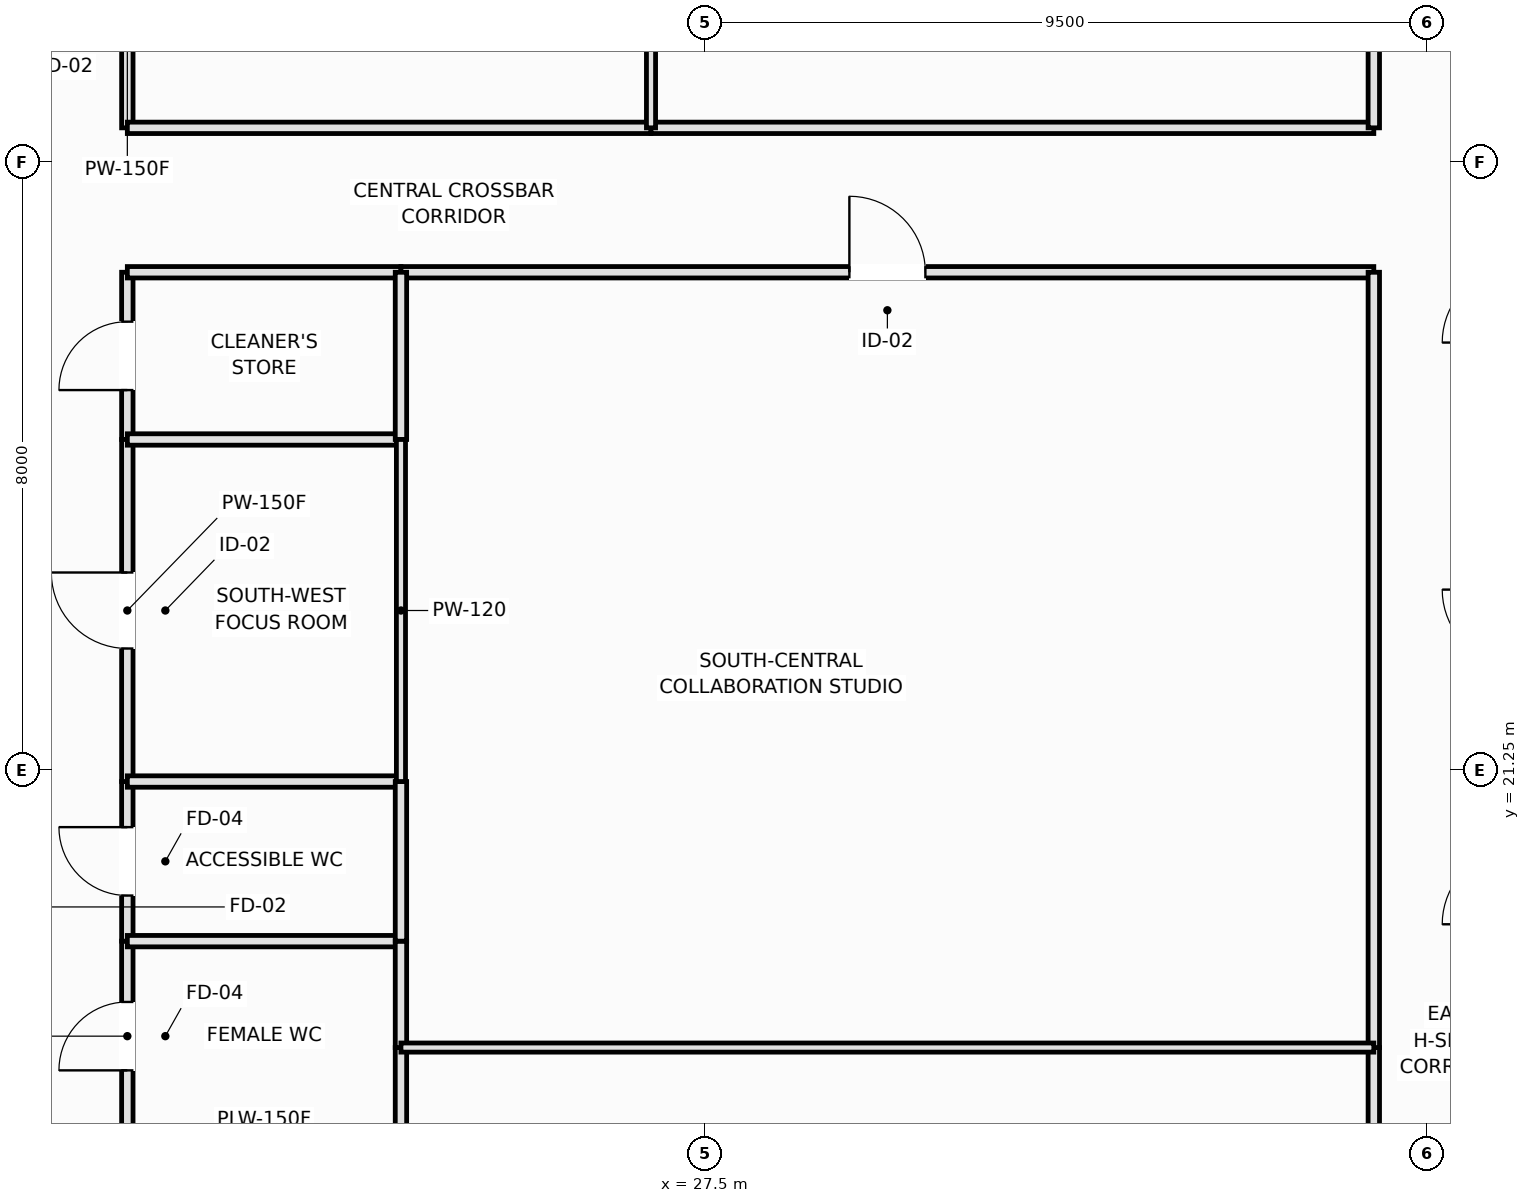
"""IFC4 building model, lengths in metres.
Left out: names, types, materials, properties, quantities, classifications, styles, units other than length and angle.
Written with IfcOpenShell. Run it as: python <this file> out.ifc"""

import sys

from ifc_helpers import new_model, si_unit, direction, frame, frame_2d, origin, place, context, subcontext, project, spatial, rectangle, extrude, element, fill, save


model = new_model("IFC4")
c1 = context("Model", 3, precision=1e-05, world=origin(), true_north=direction((0.0, 1.0)))
c2 = subcontext(c1, "Body", "Model", "MODEL_VIEW")
j1 = project(units=[si_unit("LENGTHUNIT", "METRE"), si_unit("PLANEANGLEUNIT", "RADIAN")], contexts=[c1])
p1 = place(None, origin())
s1 = spatial("IfcSite", under=j1, at=p1, CompositionType="ELEMENT")
p2 = place(p1, origin())
s2 = spatial("IfcBuilding", under=s1, at=p2, CompositionType="ELEMENT")
p3 = place(p2, frame((0.0, 0.0, 281.2)))
s3 = spatial("IfcBuildingStorey", under=s2, at=p3, CompositionType="ELEMENT", Elevation=281.2)
p4 = place(p3, frame((19.9, 29.7, 0.0), z_axis=(0.0, 0.0, 1.0), x_axis=(0.0, 1.0, 0.0)))
e1 = element("IfcWall", 1, at=p4, inside=s3, PredefinedType="PARTITIONING", context=c2, shape_type="SweptSolid", body=[
    extrude(rectangle(XDim=4.9, YDim=0.15, at=frame_2d((2.45, 0.0))), origin(), (0.0, 0.0, 1.0), 3.39),
])
p5 = place(p4, frame((1.95, 0.0, 0.0)))
e2 = element("IfcOpeningElement", 2, at=p5, cuts=e1, PredefinedType="OPENING", context=c2, shape_type="SweptSolid", body=[
    extrude(rectangle(XDim=1.0, YDim=2.15, at=frame_2d((0.5, 1.075))), frame((0.0, 0.085, 0.0), z_axis=(0.0, -1.0, 0.0), x_axis=(1.0, 0.0, 0.0)), (0.0, 0.0, 1.0), 0.17),
])
p6 = place(p3, frame((19.9, 16.5, 0.0), z_axis=(0.0, 0.0, 1.0), x_axis=(0.0, 1.0, 0.0)))
e3 = element("IfcWall", 3, at=p6, inside=s3, PredefinedType="PLUMBINGWALL", context=c2, shape_type="SweptSolid", body=[
    extrude(rectangle(XDim=2.5, YDim=0.15, at=frame_2d((1.25, 0.0))), origin(), (0.0, 0.0, 1.0), 3.39),
])
p7 = place(p6, frame((0.8, 0.0, 0.0)))
e4 = element("IfcOpeningElement", 4, at=p7, cuts=e3, PredefinedType="OPENING", context=c2, shape_type="SweptSolid", body=[
    extrude(rectangle(XDim=0.9, YDim=2.1, at=frame_2d((0.45, 1.05))), frame((0.0, 0.085, 0.0), z_axis=(0.0, -1.0, 0.0), x_axis=(1.0, 0.0, 0.0)), (0.0, 0.0, 1.0), 0.17),
])
p8 = place(p3, frame((19.9, 19.0, 0.0), z_axis=(0.0, 0.0, 1.0), x_axis=(0.0, 1.0, 0.0)))
e5 = element("IfcWall", 5, at=p8, inside=s3, PredefinedType="PLUMBINGWALL", context=c2, shape_type="SweptSolid", body=[
    extrude(rectangle(XDim=2.1, YDim=0.15, at=frame_2d((1.05, 0.0))), origin(), (0.0, 0.0, 1.0), 3.39),
])
p9 = place(p8, frame((0.6, 0.0, 0.0)))
e6 = element("IfcOpeningElement", 6, at=p9, cuts=e5, PredefinedType="OPENING", context=c2, shape_type="SweptSolid", body=[
    extrude(rectangle(XDim=0.9, YDim=2.1, at=frame_2d((0.45, 1.05))), frame((0.0, 0.085, 0.0), z_axis=(0.0, -1.0, 0.0), x_axis=(1.0, 0.0, 0.0)), (0.0, 0.0, 1.0), 0.17),
])
p10 = place(p3, frame((19.9, 25.6, 0.0), z_axis=(0.0, 0.0, 1.0), x_axis=(0.0, 1.0, 0.0)))
e7 = element("IfcWall", 7, at=p10, inside=s3, PredefinedType="PLUMBINGWALL", context=c2, shape_type="SweptSolid", body=[
    extrude(rectangle(XDim=2.2, YDim=0.15, at=frame_2d((1.1, 0.0))), origin(), (0.0, 0.0, 1.0), 3.39),
])
p11 = place(p10, frame((0.65, 0.0, 0.0)))
e8 = element("IfcOpeningElement", 8, at=p11, cuts=e7, PredefinedType="OPENING", context=c2, shape_type="SweptSolid", body=[
    extrude(rectangle(XDim=0.9, YDim=2.1, at=frame_2d((0.45, 1.05))), frame((0.0, 0.085, 0.0), z_axis=(0.0, -1.0, 0.0), x_axis=(1.0, 0.0, 0.0)), (0.0, 0.0, 1.0), 0.17),
])
p12 = place(p3, frame((19.9, 21.1, 0.0), z_axis=(0.0, 0.0, 1.0), x_axis=(0.0, 1.0, 0.0)))
e9 = element("IfcWall", 9, at=p12, inside=s3, PredefinedType="PARTITIONING", context=c2, shape_type="SweptSolid", body=[
    extrude(rectangle(XDim=4.5, YDim=0.15, at=frame_2d((2.25, 0.0))), origin(), (0.0, 0.0, 1.0), 3.39),
])
p13 = place(p12, frame((1.75, 0.0, 0.0)))
e10 = element("IfcOpeningElement", 10, at=p13, cuts=e9, PredefinedType="OPENING", context=c2, shape_type="SweptSolid", body=[
    extrude(rectangle(XDim=1.0, YDim=2.15, at=frame_2d((0.5, 1.075))), frame((0.0, 0.085, 0.0), z_axis=(0.0, -1.0, 0.0), x_axis=(1.0, 0.0, 0.0)), (0.0, 0.0, 1.0), 0.17),
])
p14 = place(p3, frame((19.9, 29.7, 0.0), z_axis=(0.0, 0.0, 1.0), x_axis=(1.0, 0.0, 0.0)))
e11 = element("IfcWall", 11, at=p14, inside=s3, PredefinedType="PARTITIONING", context=c2, shape_type="SweptSolid", body=[
    extrude(rectangle(XDim=6.89, YDim=0.15, at=frame_2d((3.445, 0.0))), origin(), (0.0, 0.0, 1.0), 3.39),
])
p15 = place(p3, frame((26.79, 29.7, 0.0), z_axis=(0.0, 0.0, 1.0), x_axis=(1.0, 0.0, 0.0)))
e12 = element("IfcWall", 12, at=p15, inside=s3, PredefinedType="PARTITIONING", context=c2, shape_type="SweptSolid", body=[
    extrude(rectangle(XDim=9.51, YDim=0.15, at=frame_2d((4.755, 0.0))), origin(), (0.0, 0.0, 1.0), 3.39),
])
p16 = place(p3, frame((19.9, 27.8, 0.0), z_axis=(0.0, 0.0, 1.0), x_axis=(1.0, 0.0, 0.0)))
e13 = element("IfcWall", 13, at=p16, inside=s3, PredefinedType="PLUMBINGWALL", context=c2, shape_type="SweptSolid", body=[
    extrude(rectangle(XDim=3.6, YDim=0.15, at=frame_2d((1.8, 0.0))), origin(), (0.0, 0.0, 1.0), 3.39),
])
p17 = place(p3, frame((23.5, 27.8, 0.0), z_axis=(0.0, 0.0, 1.0), x_axis=(1.0, 0.0, 0.0)))
e14 = element("IfcWall", 14, at=p17, inside=s3, PredefinedType="PARTITIONING", context=c2, shape_type="SweptSolid", body=[
    extrude(rectangle(XDim=12.8, YDim=0.15, at=frame_2d((6.4, 0.0))), origin(), (0.0, 0.0, 1.0), 3.39),
])
p18 = place(p17, frame((5.9, 0.0, 0.0)))
e15 = element("IfcOpeningElement", 15, at=p18, cuts=e14, PredefinedType="OPENING", context=c2, shape_type="SweptSolid", body=[
    extrude(rectangle(XDim=1.0, YDim=2.15, at=frame_2d((0.5, 1.075))), frame((0.0, 0.085, 0.0), z_axis=(0.0, -1.0, 0.0), x_axis=(1.0, 0.0, 0.0)), (0.0, 0.0, 1.0), 0.17),
])
p19 = place(p3, frame((36.3, 29.7, 0.0), z_axis=(0.0, 0.0, 1.0), x_axis=(0.0, 1.0, 0.0)))
e16 = element("IfcWall", 16, at=p19, inside=s3, PredefinedType="PARTITIONING", context=c2, shape_type="SweptSolid", body=[
    extrude(rectangle(XDim=4.9, YDim=0.15, at=frame_2d((2.45, 0.0))), origin(), (0.0, 0.0, 1.0), 3.39),
])
p20 = place(p19, frame((1.95, 0.0, 0.0)))
e17 = element("IfcOpeningElement", 17, at=p20, cuts=e16, PredefinedType="OPENING", context=c2, shape_type="SweptSolid", body=[
    extrude(rectangle(XDim=1.0, YDim=2.15, at=frame_2d((0.5, 1.075))), frame((0.0, 0.085, 0.0), z_axis=(0.0, -1.0, 0.0), x_axis=(1.0, 0.0, 0.0)), (0.0, 0.0, 1.0), 0.17),
])
p21 = place(p3, frame((36.3, 14.0, 0.0), z_axis=(0.0, 0.0, 1.0), x_axis=(0.0, 1.0, 0.0)))
e18 = element("IfcWall", 18, at=p21, inside=s3, PredefinedType="PARTITIONING", context=c2, shape_type="SweptSolid", body=[
    extrude(rectangle(XDim=3.6, YDim=0.15, at=frame_2d((1.8, 0.0))), origin(), (0.0, 0.0, 1.0), 3.39),
])
p22 = place(p21, frame((1.3, 0.0, 0.0)))
e19 = element("IfcOpeningElement", 19, at=p22, cuts=e18, PredefinedType="OPENING", context=c2, shape_type="SweptSolid", body=[
    extrude(rectangle(XDim=1.0, YDim=2.15, at=frame_2d((0.5, 1.075))), frame((0.0, 0.085, 0.0), z_axis=(0.0, -1.0, 0.0), x_axis=(1.0, 0.0, 0.0)), (0.0, 0.0, 1.0), 0.17),
])
p23 = place(p3, frame((36.3, 17.6, 0.0), z_axis=(0.0, 0.0, 1.0), x_axis=(0.0, 1.0, 0.0)))
e20 = element("IfcWall", 20, at=p23, inside=s3, PredefinedType="PARTITIONING", context=c2, shape_type="SweptSolid", body=[
    extrude(rectangle(XDim=10.2, YDim=0.15, at=frame_2d((5.1, 0.0))), origin(), (0.0, 0.0, 1.0), 3.39),
])
p24 = place(p3, frame((26.79, 29.7, 0.0), z_axis=(0.0, 0.0, 1.0), x_axis=(0.0, 1.0, 0.0)))
e21 = element("IfcWall", 21, at=p24, inside=s3, PredefinedType="PARTITIONING", context=c2, shape_type="SweptSolid", body=[
    extrude(rectangle(XDim=4.9, YDim=0.12, at=frame_2d((2.45, 0.0))), origin(), (0.0, 0.0, 1.0), 3.39),
])
p25 = place(p3, frame((19.9, 19.0, 0.0), z_axis=(0.0, 0.0, 1.0), x_axis=(1.0, 0.0, 0.0)))
e22 = element("IfcWall", 22, at=p25, inside=s3, PredefinedType="PLUMBINGWALL", context=c2, shape_type="SweptSolid", body=[
    extrude(rectangle(XDim=3.6, YDim=0.15, at=frame_2d((1.8, 0.0))), origin(), (0.0, 0.0, 1.0), 3.39),
])
p26 = place(p3, frame((23.5, 16.5, 0.0), z_axis=(0.0, 0.0, 1.0), x_axis=(0.0, 1.0, 0.0)))
e23 = element("IfcWall", 23, at=p26, inside=s3, PredefinedType="PLUMBINGWALL", context=c2, shape_type="SweptSolid", body=[
    extrude(rectangle(XDim=1.1, YDim=0.15, at=frame_2d((0.55, 0.0))), origin(), (0.0, 0.0, 1.0), 3.39),
])
p27 = place(p3, frame((23.5, 17.6, 0.0), z_axis=(0.0, 0.0, 1.0), x_axis=(0.0, 1.0, 0.0)))
e24 = element("IfcWall", 24, at=p27, inside=s3, PredefinedType="PLUMBINGWALL", context=c2, shape_type="SweptSolid", body=[
    extrude(rectangle(XDim=1.4, YDim=0.15, at=frame_2d((0.7, 0.0))), origin(), (0.0, 0.0, 1.0), 3.39),
])
p28 = place(p3, frame((19.9, 21.1, 0.0), z_axis=(0.0, 0.0, 1.0), x_axis=(1.0, 0.0, 0.0)))
e25 = element("IfcWall", 25, at=p28, inside=s3, PredefinedType="PLUMBINGWALL", context=c2, shape_type="SweptSolid", body=[
    extrude(rectangle(XDim=3.6, YDim=0.15, at=frame_2d((1.8, 0.0))), origin(), (0.0, 0.0, 1.0), 3.39),
])
p29 = place(p3, frame((23.5, 19.0, 0.0), z_axis=(0.0, 0.0, 1.0), x_axis=(0.0, 1.0, 0.0)))
e26 = element("IfcWall", 26, at=p29, inside=s3, PredefinedType="PLUMBINGWALL", context=c2, shape_type="SweptSolid", body=[
    extrude(rectangle(XDim=2.1, YDim=0.15, at=frame_2d((1.05, 0.0))), origin(), (0.0, 0.0, 1.0), 3.39),
])
p30 = place(p3, frame((19.9, 25.6, 0.0), z_axis=(0.0, 0.0, 1.0), x_axis=(1.0, 0.0, 0.0)))
e27 = element("IfcWall", 27, at=p30, inside=s3, PredefinedType="PLUMBINGWALL", context=c2, shape_type="SweptSolid", body=[
    extrude(rectangle(XDim=3.6, YDim=0.15, at=frame_2d((1.8, 0.0))), origin(), (0.0, 0.0, 1.0), 3.39),
])
p31 = place(p3, frame((23.5, 25.6, 0.0), z_axis=(0.0, 0.0, 1.0), x_axis=(0.0, 1.0, 0.0)))
e28 = element("IfcWall", 28, at=p31, inside=s3, PredefinedType="PLUMBINGWALL", context=c2, shape_type="SweptSolid", body=[
    extrude(rectangle(XDim=2.2, YDim=0.15, at=frame_2d((1.1, 0.0))), origin(), (0.0, 0.0, 1.0), 3.39),
])
p32 = place(p3, frame((23.5, 21.1, 0.0), z_axis=(0.0, 0.0, 1.0), x_axis=(0.0, 1.0, 0.0)))
e29 = element("IfcWall", 29, at=p32, inside=s3, PredefinedType="PARTITIONING", context=c2, shape_type="SweptSolid", body=[
    extrude(rectangle(XDim=4.5, YDim=0.12, at=frame_2d((2.25, 0.0))), origin(), (0.0, 0.0, 1.0), 3.39),
])
p33 = place(p3, frame((23.5, 17.6, 0.0), z_axis=(0.0, 0.0, 1.0), x_axis=(1.0, 0.0, 0.0)))
e30 = element("IfcWall", 30, at=p33, inside=s3, PredefinedType="PARTITIONING", context=c2, shape_type="SweptSolid", body=[
    extrude(rectangle(XDim=12.8, YDim=0.12, at=frame_2d((6.4, 0.0))), origin(), (0.0, 0.0, 1.0), 3.39),
])
p34 = place(p7, origin())
e31 = element("IfcDoor", 31, at=p34, inside=s3, OperationType="SINGLE_SWING_LEFT", PredefinedType="DOOR", context=c2, shape_type="SweptSolid", body=[
    extrude(rectangle(XDim=0.9, YDim=2.1, at=frame_2d((0.45, 1.05))), frame((0.0, 0.025, 0.0), z_axis=(0.0, -1.0, 0.0), x_axis=(1.0, 0.0, 0.0)), (0.0, 0.0, 1.0), 0.05),
])
fill(e4, e31)
p35 = place(p9, origin())
e32 = element("IfcDoor", 32, at=p35, inside=s3, OperationType="SINGLE_SWING_RIGHT", PredefinedType="DOOR", context=c2, shape_type="SweptSolid", body=[
    extrude(rectangle(XDim=0.9, YDim=2.1, at=frame_2d((0.45, 1.05))), frame((0.0, 0.025, 0.0), z_axis=(0.0, -1.0, 0.0), x_axis=(1.0, 0.0, 0.0)), (0.0, 0.0, 1.0), 0.05),
])
fill(e6, e32)
p36 = place(p11, origin())
e33 = element("IfcDoor", 33, at=p36, inside=s3, OperationType="SINGLE_SWING_LEFT", PredefinedType="DOOR", context=c2, shape_type="SweptSolid", body=[
    extrude(rectangle(XDim=0.9, YDim=2.1, at=frame_2d((0.45, 1.05))), frame((0.0, 0.025, 0.0), z_axis=(0.0, -1.0, 0.0), x_axis=(1.0, 0.0, 0.0)), (0.0, 0.0, 1.0), 0.05),
])
fill(e8, e33)
p37 = place(p13, origin())
e34 = element("IfcDoor", 34, at=p37, inside=s3, OperationType="SINGLE_SWING_RIGHT", PredefinedType="DOOR", context=c2, shape_type="SweptSolid", body=[
    extrude(rectangle(XDim=1.0, YDim=2.15, at=frame_2d((0.5, 1.075))), frame((0.0, 0.025, 0.0), z_axis=(0.0, -1.0, 0.0), x_axis=(1.0, 0.0, 0.0)), (0.0, 0.0, 1.0), 0.05),
])
fill(e10, e34)
p38 = place(p18, origin())
e35 = element("IfcDoor", 35, at=p38, inside=s3, OperationType="SINGLE_SWING_LEFT", PredefinedType="DOOR", context=c2, shape_type="SweptSolid", body=[
    extrude(rectangle(XDim=1.0, YDim=2.15, at=frame_2d((0.5, 1.075))), frame((0.0, 0.025, 0.0), z_axis=(0.0, -1.0, 0.0), x_axis=(1.0, 0.0, 0.0)), (0.0, 0.0, 1.0), 0.05),
])
fill(e15, e35)
save(model, sys.argv[1])
